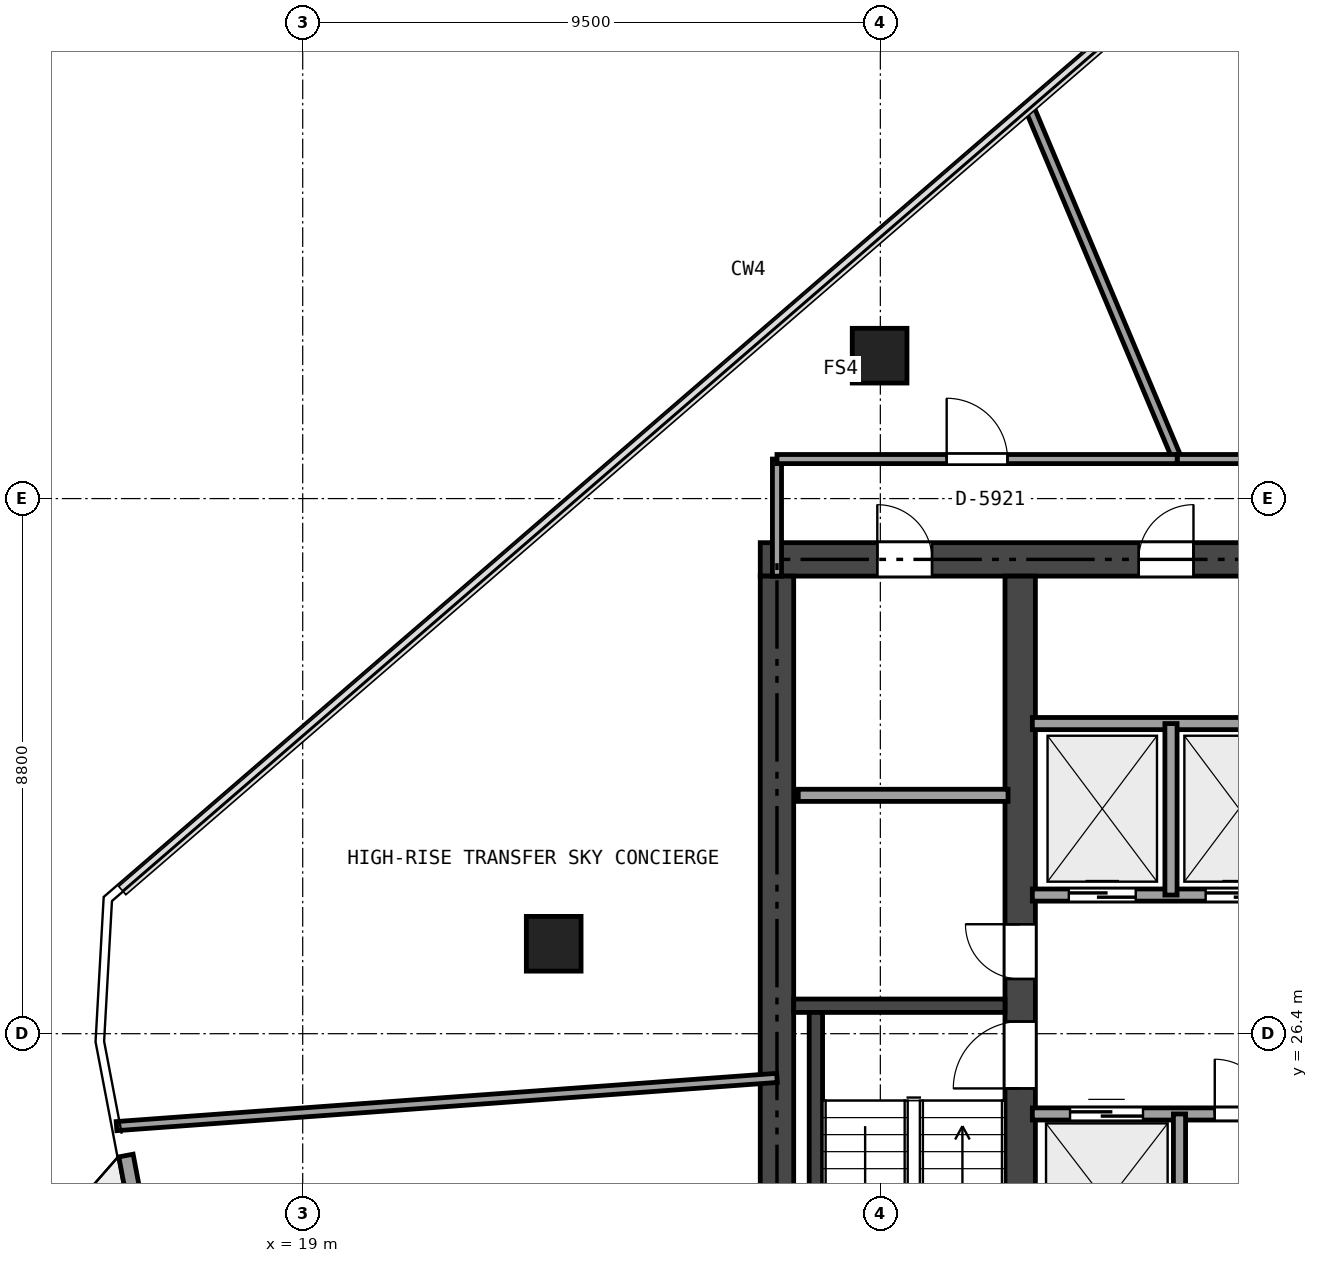
"""IFC4 building model, lengths in metres.
Left out: names, types, materials, properties, quantities, classifications, styles, units other than length and angle.
Written with IfcOpenShell. Run it as: python <this file> out.ifc"""

import sys

from ifc_helpers import new_model, si_unit, direction, frame, frame_2d, origin, origin_2d, place, context, subcontext, project, spatial, rectangle, extrude, element, fill, save


model = new_model("IFC4")
c1 = context("Model", 3, precision=1e-05, world=origin(), true_north=direction((0.0, 1.0)))
c2 = subcontext(c1, "Body", "Model", "MODEL_VIEW")
j1 = project(units=[si_unit("LENGTHUNIT", "METRE"), si_unit("PLANEANGLEUNIT", "RADIAN")], contexts=[c1])
p1 = place(None, origin())
s1 = spatial("IfcSite", under=j1, at=p1, CompositionType="ELEMENT")
p2 = place(p1, origin())
s2 = spatial("IfcBuilding", under=s1, at=p2, CompositionType="ELEMENT")
p3 = place(p2, frame((0.0, 0.0, 220.2)))
s3 = spatial("IfcBuildingStorey", under=s2, at=p3, CompositionType="ELEMENT", Elevation=220.2)
p4 = place(p3, frame((26.525, 34.2, 0.0), z_axis=(0.0, 0.0, 1.0), x_axis=(1.0, 0.0, 0.0)))
e1 = element("IfcWall", 1, at=p4, inside=s3, PredefinedType="SHEAR", context=c2, shape_type="SweptSolid", body=[
    extrude(rectangle(XDim=21.35, YDim=0.55, at=frame_2d((10.675, 0.0))), origin(), (0.0, 0.0, 1.0), 3.24),
])
p5 = place(p4, frame((9.675, 0.0, 0.0)))
e2 = element("IfcOpeningElement", 2, at=p5, cuts=e1, PredefinedType="OPENING", context=c2, shape_type="SweptSolid", body=[
    extrude(rectangle(XDim=1.1, YDim=2.15, at=frame_2d((0.55, 1.075))), frame((0.0, 0.285, 0.0), z_axis=(0.0, -1.0, 0.0), x_axis=(1.0, 0.0, 0.0)), (0.0, 0.0, 1.0), 0.57),
])
p6 = place(p4, frame((1.925, 0.0, 0.0)))
e3 = element("IfcOpeningElement", 3, at=p6, cuts=e1, PredefinedType="OPENING", context=c2, shape_type="SweptSolid", body=[
    extrude(rectangle(XDim=0.9, YDim=2.1, at=frame_2d((0.45, 1.05))), frame((0.0, 0.285, 0.0), z_axis=(0.0, -1.0, 0.0), x_axis=(1.0, 0.0, 0.0)), (0.0, 0.0, 1.0), 0.57),
])
p7 = place(p4, frame((6.225, 0.0, 0.0)))
e4 = element("IfcOpeningElement", 4, at=p7, cuts=e1, PredefinedType="OPENING", context=c2, shape_type="SweptSolid", body=[
    extrude(rectangle(XDim=0.9, YDim=2.1, at=frame_2d((0.45, 1.05))), frame((0.0, 0.285, 0.0), z_axis=(0.0, -1.0, 0.0), x_axis=(1.0, 0.0, 0.0)), (0.0, 0.0, 1.0), 0.57),
])
p8 = place(p3, frame((26.8, 18.875, 0.0), z_axis=(0.0, 0.0, 1.0), x_axis=(0.0, 1.0, 0.0)))
e5 = element("IfcWall", 5, at=p8, inside=s3, PredefinedType="SHEAR", context=c2, shape_type="SweptSolid", body=[
    extrude(rectangle(XDim=15.05, YDim=0.55, at=frame_2d((7.525, 0.0))), origin(), (0.0, 0.0, 1.0), 3.24),
])
p9 = place(p3, frame((30.8, 18.875, 0.0), z_axis=(0.0, 0.0, 1.0), x_axis=(0.0, 1.0, 0.0)))
e6 = element("IfcWall", 6, at=p9, inside=s3, PredefinedType="SHEAR", context=c2, shape_type="SweptSolid", body=[
    extrude(rectangle(XDim=15.05, YDim=0.5, at=frame_2d((7.525, 0.0))), origin(), (0.0, 0.0, 1.0), 3.24),
])
p10 = place(p9, frame((6.625, 0.0, 0.0)))
e7 = element("IfcOpeningElement", 7, at=p10, cuts=e6, PredefinedType="OPENING", context=c2, shape_type="SweptSolid", body=[
    extrude(rectangle(XDim=1.1, YDim=2.15, at=frame_2d((0.55, 1.075))), frame((0.0, 0.26, 0.0), z_axis=(0.0, -1.0, 0.0), x_axis=(1.0, 0.0, 0.0)), (0.0, 0.0, 1.0), 0.52),
])
p11 = place(p9, frame((8.425, 0.0, 0.0)))
e8 = element("IfcOpeningElement", 8, at=p11, cuts=e6, PredefinedType="OPENING", context=c2, shape_type="SweptSolid", body=[
    extrude(rectangle(XDim=0.9, YDim=2.1, at=frame_2d((0.45, 1.05))), frame((0.0, 0.26, 0.0), z_axis=(0.0, -1.0, 0.0), x_axis=(1.0, 0.0, 0.0)), (0.0, 0.0, 1.0), 0.52),
])
p12 = place(p3, frame((27.075, 26.86, 0.0), z_axis=(0.0, 0.0, 1.0), x_axis=(1.0, 0.0, 0.0)))
e9 = element("IfcWall", 9, at=p12, inside=s3, PredefinedType="SHEAR", context=c2, shape_type="SweptSolid", body=[
    extrude(rectangle(XDim=3.475, YDim=0.22, at=frame_2d((1.738, 0.0))), origin(), (0.0, 0.0, 1.0), 3.24),
])
p13 = place(p3, frame((27.44, 19.35, 0.0), z_axis=(0.0, 0.0, 1.0), x_axis=(0.0, 1.0, 0.0)))
e10 = element("IfcWall", 10, at=p13, inside=s3, PredefinedType="SHEAR", context=c2, shape_type="SweptSolid", body=[
    extrude(rectangle(XDim=7.4, YDim=0.22, at=frame_2d((3.7, 0.0))), origin(), (0.0, 0.0, 1.0), 3.24),
])
for number, where, z_axis, x_axis in (
    (11, (28.488, 37.55, 0.0), (0.0, 0.0, 1.0), (1.0, 0.0, 0.0)),
    (12, (23.128, 27.879, 0.0), (0.0, 0.0, 1.0), (1.0, 0.0, 0.0)),
):
    element("IfcColumn", number, at=place(p3, frame(where, z_axis=z_axis, x_axis=x_axis)), inside=s3, PredefinedType="COLUMN", context=c2, shape_type="SweptSolid", body=[
        extrude(rectangle(XDim=0.9, YDim=0.9, at=origin_2d()), origin(), (0.0, 0.0, 1.0), 3.24),
    ])
p14 = place(p3, frame((16.842, 20.467, 0.0), z_axis=(0.0, 0.0, 1.0), x_axis=(-0.187269178691, 0.982308635161, 0.0)))
e13 = element("IfcWall", 13, at=p14, inside=s3, PredefinedType="SOLIDWALL", context=c2, shape_type="SweptSolid", body=[
    extrude(rectangle(XDim=4.0, YDim=0.24, at=frame_2d((2.0, 0.0))), origin(), (0.0, 0.0, 1.0), 3.24),
])
p15 = place(p14, frame((1.5, 0.0, 0.0)))
e14 = element("IfcOpeningElement", 14, at=p15, cuts=e13, PredefinedType="OPENING", context=c2, shape_type="SweptSolid", body=[
    extrude(rectangle(XDim=1.0, YDim=2.15, at=frame_2d((0.5, 1.075))), frame((0.0, 0.13, 0.0), z_axis=(0.0, -1.0, 0.0), x_axis=(1.0, 0.0, 0.0)), (0.0, 0.0, 1.0), 0.26),
])
p16 = place(p3, frame((27.15, 30.32, 0.0), z_axis=(0.0, 0.0, 1.0), x_axis=(1.0, 0.0, 0.0)))
e15 = element("IfcWall", 15, at=p16, inside=s3, PredefinedType="SOLIDWALL", context=c2, shape_type="SweptSolid", body=[
    extrude(rectangle(XDim=3.45, YDim=0.2, at=frame_2d((1.725, 0.0))), origin(), (0.0, 0.0, 1.0), 3.24),
])
p17 = place(p3, frame((31.0, 28.68, 0.0), z_axis=(0.0, 0.0, 1.0), x_axis=(1.0, 0.0, 0.0)))
e16 = element("IfcWall", 16, at=p17, inside=s3, PredefinedType="SOLIDWALL", context=c2, shape_type="SweptSolid", body=[
    extrude(rectangle(XDim=4.42, YDim=0.2, at=frame_2d((2.21, 0.0))), origin(), (0.0, 0.0, 1.0), 3.24),
])
p18 = place(p17, frame((0.6, 0.0, 0.0)))
e17 = element("IfcOpeningElement", 17, at=p18, cuts=e16, PredefinedType="OPENING", context=c2, shape_type="SweptSolid", body=[
    extrude(rectangle(XDim=1.1, YDim=2.15, at=frame_2d((0.55, 1.075))), frame((0.0, 0.11, 0.0), z_axis=(0.0, -1.0, 0.0), x_axis=(1.0, 0.0, 0.0)), (0.0, 0.0, 1.0), 0.22),
])
p19 = place(p17, frame((2.85, 0.0, 0.0)))
e18 = element("IfcOpeningElement", 18, at=p19, cuts=e16, PredefinedType="OPENING", context=c2, shape_type="SweptSolid", body=[
    extrude(rectangle(XDim=1.1, YDim=2.15, at=frame_2d((0.55, 1.075))), frame((0.0, 0.11, 0.0), z_axis=(0.0, -1.0, 0.0), x_axis=(1.0, 0.0, 0.0)), (0.0, 0.0, 1.0), 0.22),
])
p20 = place(p3, frame((31.0, 31.5, 0.0), z_axis=(0.0, 0.0, 1.0), x_axis=(1.0, 0.0, 0.0)))
e19 = element("IfcWall", 19, at=p20, inside=s3, PredefinedType="SOLIDWALL", context=c2, shape_type="SweptSolid", body=[
    extrude(rectangle(XDim=4.42, YDim=0.2, at=frame_2d((2.21, 0.0))), origin(), (0.0, 0.0, 1.0), 3.24),
])
p21 = place(p3, frame((33.28, 28.68, 0.0), z_axis=(0.0, 0.0, 1.0), x_axis=(0.0, 1.0, 0.0)))
e20 = element("IfcWall", 20, at=p21, inside=s3, PredefinedType="SOLIDWALL", context=c2, shape_type="SweptSolid", body=[
    extrude(rectangle(XDim=2.82, YDim=0.2, at=frame_2d((1.41, 0.0))), origin(), (0.0, 0.0, 1.0), 3.24),
])
p22 = place(p3, frame((31.0, 25.08, 0.0), z_axis=(0.0, 0.0, 1.0), x_axis=(1.0, 0.0, 0.0)))
e21 = element("IfcWall", 21, at=p22, inside=s3, PredefinedType="SOLIDWALL", context=c2, shape_type="SweptSolid", body=[
    extrude(rectangle(XDim=4.42, YDim=0.2, at=frame_2d((2.21, 0.0))), origin(), (0.0, 0.0, 1.0), 3.24),
])
p23 = place(p22, frame((3.0, 0.0, 0.0)))
e22 = element("IfcOpeningElement", 22, at=p23, cuts=e21, PredefinedType="OPENING", context=c2, shape_type="SweptSolid", body=[
    extrude(rectangle(XDim=0.9, YDim=2.1, at=frame_2d((0.45, 1.05))), frame((0.0, 0.11, 0.0), z_axis=(0.0, -1.0, 0.0), x_axis=(1.0, 0.0, 0.0)), (0.0, 0.0, 1.0), 0.22),
])
p24 = place(p22, frame((0.62, 0.0, 0.0)))
e23 = element("IfcOpeningElement", 23, at=p24, cuts=e21, PredefinedType="OPENING", context=c2, shape_type="SweptSolid", body=[
    extrude(rectangle(XDim=1.2, YDim=2.15, at=frame_2d((0.6, 1.075))), frame((0.0, 0.11, 0.0), z_axis=(0.0, -1.0, 0.0), x_axis=(1.0, 0.0, 0.0)), (0.0, 0.0, 1.0), 0.22),
])
p25 = place(p3, frame((33.42, 18.95, 0.0), z_axis=(0.0, 0.0, 1.0), x_axis=(0.0, 1.0, 0.0)))
e24 = element("IfcWall", 24, at=p25, inside=s3, PredefinedType="SOLIDWALL", context=c2, shape_type="SweptSolid", body=[
    extrude(rectangle(XDim=6.13, YDim=0.2, at=frame_2d((3.065, 0.0))), origin(), (0.0, 0.0, 1.0), 2.761),
])
p26 = place(p3, frame((30.932, 41.674, 0.0), z_axis=(0.0, 0.0, 1.0), x_axis=(0.38778750602, -0.921748799931, 0.0)))
e25 = element("IfcWall", 25, at=p26, inside=s3, PredefinedType="PARTITIONING", context=c2, shape_type="SweptSolid", body=[
    extrude(rectangle(XDim=6.318, YDim=0.15, at=frame_2d((3.159, 0.0))), origin(), (0.0, 0.0, 1.0), 2.825),
])
p27 = place(p3, frame((33.382, 35.85, 0.0), z_axis=(0.0, 0.0, 1.0), x_axis=(1.0, 0.0, 0.0)))
e26 = element("IfcWall", 26, at=p27, inside=s3, PredefinedType="PARTITIONING", context=c2, shape_type="SweptSolid", body=[
    extrude(rectangle(XDim=4.748, YDim=0.15, at=frame_2d((2.374, 0.0))), origin(), (0.0, 0.0, 1.0), 2.617),
])
p28 = place(p27, frame((1.874, 0.0, 0.0)))
e27 = element("IfcOpeningElement", 27, at=p28, cuts=e26, PredefinedType="OPENING", context=c2, shape_type="SweptSolid", body=[
    extrude(rectangle(XDim=1.0, YDim=2.15, at=frame_2d((0.5, 1.075))), frame((0.0, 0.085, 0.0), z_axis=(0.0, -1.0, 0.0), x_axis=(1.0, 0.0, 0.0)), (0.0, 0.0, 1.0), 0.17),
])
p29 = place(p3, frame((15.938, 24.88, 0.0), z_axis=(0.0, 0.0, 1.0), x_axis=(0.997344218628, 0.072832064155, 0.0)))
e28 = element("IfcWall", 28, at=p29, inside=s3, PredefinedType="PARTITIONING", context=c2, shape_type="SweptSolid", body=[
    extrude(rectangle(XDim=10.891, YDim=0.15, at=frame_2d((5.445, 0.0))), origin(), (0.0, 0.0, 1.0), 2.825),
])
p30 = place(p3, frame((26.8, 33.925, 0.0), z_axis=(0.0, 0.0, 1.0), x_axis=(0.0, 1.0, 0.0)))
e29 = element("IfcWall", 29, at=p30, inside=s3, PredefinedType="PARTITIONING", context=c2, shape_type="SweptSolid", body=[
    extrude(rectangle(XDim=1.925, YDim=0.15, at=frame_2d((0.962, 0.0))), origin(), (0.0, 0.0, 1.0), 2.825),
])
p31 = place(p3, frame((26.8, 35.85, 0.0), z_axis=(0.0, 0.0, 1.0), x_axis=(1.0, 0.0, 0.0)))
e30 = element("IfcWall", 30, at=p31, inside=s3, PredefinedType="PARTITIONING", context=c2, shape_type="SweptSolid", body=[
    extrude(rectangle(XDim=6.582, YDim=0.15, at=frame_2d((3.291, 0.0))), origin(), (0.0, 0.0, 1.0), 2.617),
])
p32 = place(p31, frame((2.791, 0.0, 0.0)))
e31 = element("IfcOpeningElement", 31, at=p32, cuts=e30, PredefinedType="OPENING", context=c2, shape_type="SweptSolid", body=[
    extrude(rectangle(XDim=1.0, YDim=2.15, at=frame_2d((0.5, 1.075))), frame((0.0, 0.085, 0.0), z_axis=(0.0, -1.0, 0.0), x_axis=(1.0, 0.0, 0.0)), (0.0, 0.0, 1.0), 0.17),
])
p33 = place(p10, origin())
e32 = element("IfcDoor", 32, at=p33, inside=s3, OperationType="SINGLE_SWING_LEFT", PredefinedType="DOOR", context=c2, shape_type="SweptSolid", body=[
    extrude(rectangle(XDim=1.1, YDim=2.15, at=frame_2d((0.55, 1.075))), frame((0.0, 0.025, 0.0), z_axis=(0.0, -1.0, 0.0), x_axis=(1.0, 0.0, 0.0)), (0.0, 0.0, 1.0), 0.05),
])
fill(e7, e32)
p34 = place(p11, origin())
e33 = element("IfcDoor", 33, at=p34, inside=s3, OperationType="SINGLE_SWING_RIGHT", PredefinedType="DOOR", context=c2, shape_type="SweptSolid", body=[
    extrude(rectangle(XDim=0.9, YDim=2.1, at=frame_2d((0.45, 1.05))), frame((0.0, 0.025, 0.0), z_axis=(0.0, -1.0, 0.0), x_axis=(1.0, 0.0, 0.0)), (0.0, 0.0, 1.0), 0.05),
])
fill(e8, e33)
p35 = place(p6, origin())
e34 = element("IfcDoor", 34, at=p35, inside=s3, OperationType="SINGLE_SWING_LEFT", PredefinedType="DOOR", context=c2, shape_type="SweptSolid", body=[
    extrude(rectangle(XDim=0.9, YDim=2.1, at=frame_2d((0.45, 1.05))), frame((0.0, 0.025, 0.0), z_axis=(0.0, -1.0, 0.0), x_axis=(1.0, 0.0, 0.0)), (0.0, 0.0, 1.0), 0.05),
])
fill(e3, e34)
p36 = place(p7, origin())
e35 = element("IfcDoor", 35, at=p36, inside=s3, OperationType="SINGLE_SWING_RIGHT", PredefinedType="DOOR", context=c2, shape_type="SweptSolid", body=[
    extrude(rectangle(XDim=0.9, YDim=2.1, at=frame_2d((0.45, 1.05))), frame((0.0, 0.025, 0.0), z_axis=(0.0, -1.0, 0.0), x_axis=(1.0, 0.0, 0.0)), (0.0, 0.0, 1.0), 0.05),
])
fill(e4, e35)
p37 = place(p23, origin())
e36 = element("IfcDoor", 36, at=p37, inside=s3, OperationType="SINGLE_SWING_LEFT", PredefinedType="DOOR", context=c2, shape_type="SweptSolid", body=[
    extrude(rectangle(XDim=0.9, YDim=2.1, at=frame_2d((0.45, 1.05))), frame((0.0, 0.025, 0.0), z_axis=(0.0, -1.0, 0.0), x_axis=(1.0, 0.0, 0.0)), (0.0, 0.0, 1.0), 0.05),
])
fill(e22, e36)
p38 = place(p18, origin())
e37 = element("IfcDoor", 37, at=p38, inside=s3, OperationType="SLIDING_TO_LEFT", PredefinedType="DOOR", context=c2, shape_type="SweptSolid", body=[
    extrude(rectangle(XDim=1.1, YDim=2.15, at=frame_2d((0.55, 1.075))), frame((0.0, 0.025, 0.0), z_axis=(0.0, -1.0, 0.0), x_axis=(1.0, 0.0, 0.0)), (0.0, 0.0, 1.0), 0.05),
])
fill(e17, e37)
p39 = place(p19, origin())
e38 = element("IfcDoor", 38, at=p39, inside=s3, OperationType="SLIDING_TO_LEFT", PredefinedType="DOOR", context=c2, shape_type="SweptSolid", body=[
    extrude(rectangle(XDim=1.1, YDim=2.15, at=frame_2d((0.55, 1.075))), frame((0.0, 0.025, 0.0), z_axis=(0.0, -1.0, 0.0), x_axis=(1.0, 0.0, 0.0)), (0.0, 0.0, 1.0), 0.05),
])
fill(e18, e38)
p40 = place(p24, origin())
e39 = element("IfcDoor", 39, at=p40, inside=s3, OperationType="SLIDING_TO_LEFT", PredefinedType="DOOR", context=c2, shape_type="SweptSolid", body=[
    extrude(rectangle(XDim=1.2, YDim=2.15, at=frame_2d((0.6, 1.075))), frame((0.0, 0.025, 0.0), z_axis=(0.0, -1.0, 0.0), x_axis=(1.0, 0.0, 0.0)), (0.0, 0.0, 1.0), 0.05),
])
fill(e23, e39)
p41 = place(p32, origin())
e40 = element("IfcDoor", 40, at=p41, inside=s3, OperationType="SINGLE_SWING_LEFT", PredefinedType="DOOR", context=c2, shape_type="SweptSolid", body=[
    extrude(rectangle(XDim=1.0, YDim=2.15, at=frame_2d((0.5, 1.075))), frame((0.0, 0.025, 0.0), z_axis=(0.0, -1.0, 0.0), x_axis=(1.0, 0.0, 0.0)), (0.0, 0.0, 1.0), 0.05),
])
fill(e31, e40)
save(model, sys.argv[1])
